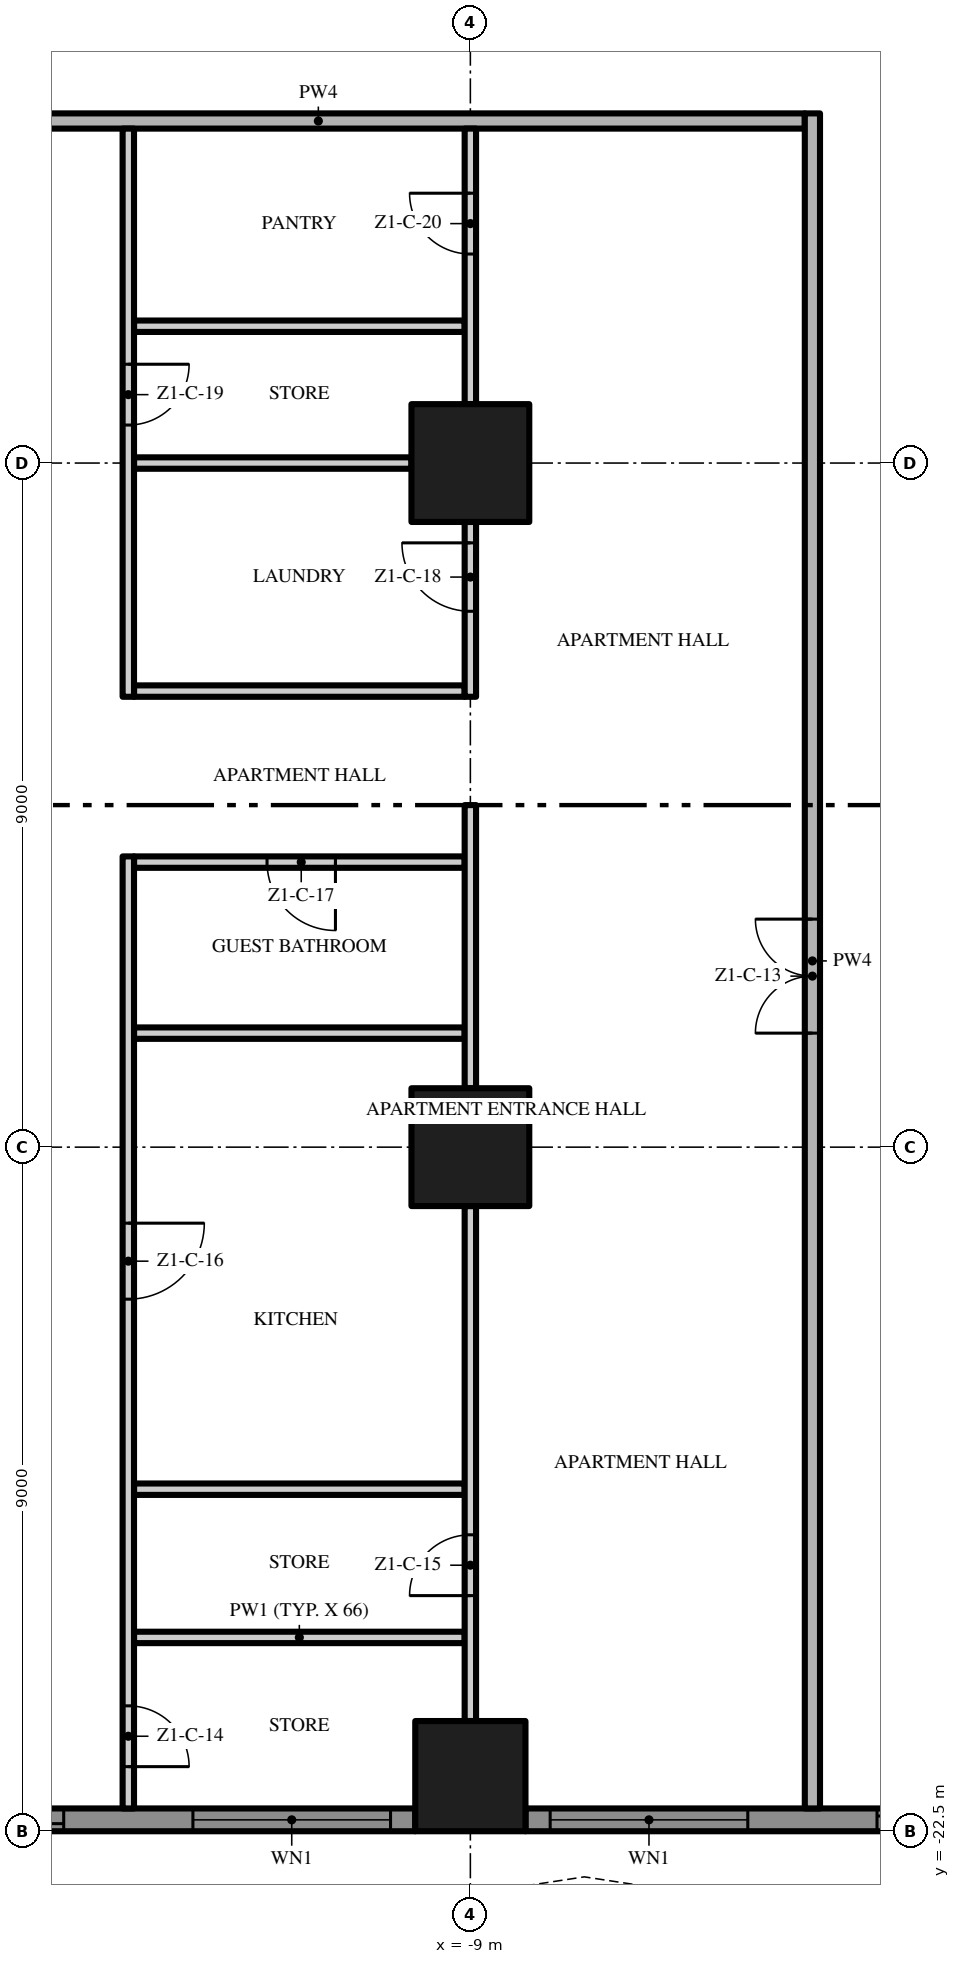
"""IFC4 building model, lengths in metres.
Left out: names, types, materials, properties, quantities, classifications, styles, units other than length and angle.
Written with IfcOpenShell. Run it as: python <this file> out.ifc"""

import sys

from ifc_helpers import new_model, si_unit, direction, frame, frame_2d, origin, origin_2d, place, context, subcontext, project, spatial, polyline, rectangle, outline, extrude, element, fill, save


model = new_model("IFC4")
c1 = context("Model", 3, precision=1e-05, world=origin(), true_north=direction((0.0, 1.0)))
c2 = subcontext(c1, "Body", "Model", "MODEL_VIEW")
j1 = project(units=[si_unit("LENGTHUNIT", "METRE"), si_unit("PLANEANGLEUNIT", "RADIAN")], contexts=[c1])
p1 = place(None, origin())
s1 = spatial("IfcSite", under=j1, at=p1, CompositionType="ELEMENT")
p2 = place(p1, origin())
s2 = spatial("IfcBuilding", under=s1, at=p2, CompositionType="ELEMENT")
p3 = place(p2, frame((0.0, 0.0, 37.8)))
s3 = spatial("IfcBuildingStorey", under=s2, at=p3, CompositionType="ELEMENT", Elevation=37.8)
p4 = place(p3, frame((-9.0, -13.5, 0.0), z_axis=(0.0, 0.0, 1.0), x_axis=(1.0, 0.0, 0.0)))
e1 = element("IfcColumn", 1, at=p4, inside=s3, PredefinedType="COLUMN", context=c2, shape_type="SweptSolid", body=[
    extrude(rectangle(XDim=1.55, YDim=1.55, at=origin_2d()), origin(), (0.0, 0.0, 1.0), 3.5),
])
p5 = place(p3, frame((-9.0, -21.775, 0.0), z_axis=(0.0, 0.0, 1.0), x_axis=(1.0, 0.0, 0.0)))
e2 = element("IfcColumn", 2, at=p5, inside=s3, PredefinedType="COLUMN", context=c2, shape_type="SweptSolid", body=[
    extrude(rectangle(XDim=1.45, YDim=1.45, at=origin_2d()), origin(), (0.0, 0.0, 1.0), 3.5),
])
p6 = place(p3, frame((-9.0, -4.5, 0.0), z_axis=(0.0, 0.0, 1.0), x_axis=(1.0, 0.0, 0.0)))
e3 = element("IfcColumn", 3, at=p6, inside=s3, PredefinedType="COLUMN", context=c2, shape_type="SweptSolid", body=[
    extrude(rectangle(XDim=1.55, YDim=1.55, at=origin_2d()), origin(), (0.0, 0.0, 1.0), 3.5),
])
p7 = place(p3, frame((-9.725, -22.35, 0.0), z_axis=(0.0, 0.0, 1.0), x_axis=(-1.0, 0.0, 0.0)))
e4 = element("IfcWall", 4, at=p7, inside=s3, PredefinedType="SOLIDWALL", context=c2, shape_type="SweptSolid", body=[
    extrude(rectangle(XDim=7.55, YDim=0.3, at=frame_2d((3.775, 0.0))), origin(), (0.0, 0.0, 1.0), 3.5),
])
p8 = place(p7, frame((4.625, 0.0, 0.0)))
e5 = element("IfcOpeningElement", 5, at=p8, cuts=e4, PredefinedType="OPENING", context=c2, shape_type="SweptSolid", body=[
    extrude(rectangle(XDim=2.6, YDim=2.4, at=frame_2d((1.3, 1.2))), frame((0.0, 0.16, 0.0), z_axis=(0.0, -1.0, 0.0), x_axis=(1.0, 0.0, 0.0)), (0.0, 0.0, 1.0), 0.32),
])
p9 = place(p7, frame((0.325, 0.0, 0.45)))
e6 = element("IfcOpeningElement", 6, at=p9, cuts=e4, PredefinedType="OPENING", context=c2, shape_type="SweptSolid", body=[
    extrude(rectangle(XDim=2.6, YDim=2.65, at=frame_2d((1.3, 1.325))), frame((0.0, 0.16, 0.0), z_axis=(0.0, -1.0, 0.0), x_axis=(1.0, 0.0, 0.0)), (0.0, 0.0, 1.0), 0.32),
])
p10 = place(p3, frame((-0.725, -22.35, 0.0), z_axis=(0.0, 0.0, 1.0), x_axis=(-1.0, 0.0, 0.0)))
e7 = element("IfcWall", 7, at=p10, inside=s3, PredefinedType="SOLIDWALL", context=c2, shape_type="SweptSolid", body=[
    extrude(rectangle(XDim=7.55, YDim=0.3, at=frame_2d((3.775, 0.0))), origin(), (0.0, 0.0, 1.0), 3.5),
])
p11 = place(p10, frame((4.625, 0.0, 0.45)))
e8 = element("IfcOpeningElement", 8, at=p11, cuts=e7, PredefinedType="OPENING", context=c2, shape_type="SweptSolid", body=[
    extrude(rectangle(XDim=2.6, YDim=2.65, at=frame_2d((1.3, 1.325))), frame((0.0, 0.16, 0.0), z_axis=(0.0, -1.0, 0.0), x_axis=(1.0, 0.0, 0.0)), (0.0, 0.0, 1.0), 0.32),
])
p12 = place(p10, frame((0.325, 0.0, 0.0)))
e9 = element("IfcOpeningElement", 9, at=p12, cuts=e7, PredefinedType="OPENING", context=c2, shape_type="SweptSolid", body=[
    extrude(rectangle(XDim=2.6, YDim=2.4, at=frame_2d((1.3, 1.2))), frame((0.0, 0.16, 0.0), z_axis=(0.0, -1.0, 0.0), x_axis=(1.0, 0.0, 0.0)), (0.0, 0.0, 1.0), 0.32),
])
p13 = place(p3, origin())
e10 = element("IfcWall", 10, at=p13, inside=s3, PredefinedType="USERDEFINED", context=c2, shape_type="SweptSolid", body=[
    extrude(outline(polyline([(-22.5, -23.1), (-21.0, -23.329), (-19.5, -23.929), (-18.0, -24.671), (-16.5, -25.271), (-15.0, -25.5), (-13.5, -25.271), (-12.0, -24.671), (-10.5, -23.929), (-9.0, -23.329), (-7.5, -23.1), (-6.0, -23.329), (-4.5, -23.929), (-3.0, -24.671), (-1.5, -25.271), (0.0, -25.5), (1.5, -25.271), (3.0, -24.671), (4.5, -23.929), (6.0, -23.329), (7.5, -23.1), (9.0, -23.329), (10.5, -23.929), (12.0, -24.671), (13.5, -25.271), (15.0, -25.5), (16.5, -25.271), (18.0, -24.671), (19.5, -23.929), (21.0, -23.329), (22.5, -23.1), (22.462, -22.853), (20.934, -23.086), (19.398, -23.701), (17.898, -24.442), (16.434, -25.028), (15.0, -25.247), (13.566, -25.028), (12.102, -24.442), (10.602, -23.701), (9.066, -23.086), (7.5, -22.847), (5.934, -23.086), (4.398, -23.701), (2.898, -24.442), (1.434, -25.028), (0.0, -25.247), (-1.434, -25.028), (-2.898, -24.442), (-4.398, -23.701), (-5.934, -23.086), (-7.5, -22.847), (-9.066, -23.086), (-10.602, -23.701), (-12.102, -24.442), (-13.566, -25.028), (-15.0, -25.247), (-16.434, -25.028), (-17.898, -24.442), (-19.398, -23.701), (-20.934, -23.086), (-22.462, -22.853), (-22.5, -23.1)])), origin(), (0.0, 0.0, 1.0), 0.9),
])
for number, where, z_axis, x_axis in (
    (11, (-13.425, -19.95, 0.0), (0.0, 0.0, 1.0), (1.0, 0.0, 0.0)),
    (12, (-13.425, -18.0, 0.0), (0.0, 0.0, 1.0), (1.0, 0.0, 0.0)),
    (13, (-13.425, -12.0, 0.0), (0.0, 0.0, 1.0), (1.0, 0.0, 0.0)),
):
    element("IfcWall", number, at=place(p3, frame(where, z_axis=z_axis, x_axis=x_axis)), inside=s3, PredefinedType="PARTITIONING", context=c2, shape_type="SweptSolid", body=[
        extrude(rectangle(XDim=4.35, YDim=0.15, at=frame_2d((2.175, 0.0))), origin(), (0.0, 0.0, 1.0), 3.5),
    ])
p14 = place(p3, frame((-9.075, -9.75, 0.0), z_axis=(0.0, 0.0, 1.0), x_axis=(-1.0, 0.0, 0.0)))
e14 = element("IfcWall", 14, at=p14, inside=s3, PredefinedType="PARTITIONING", context=c2, shape_type="SweptSolid", body=[
    extrude(rectangle(XDim=4.35, YDim=0.15, at=frame_2d((2.175, 0.0))), origin(), (0.0, 0.0, 1.0), 3.5),
])
p15 = place(p14, frame((1.7, 0.0, 0.0)))
e15 = element("IfcOpeningElement", 15, at=p15, cuts=e14, PredefinedType="OPENING", context=c2, shape_type="SweptSolid", body=[
    extrude(rectangle(XDim=0.9, YDim=2.1, at=frame_2d((0.45, 1.05))), frame((0.0, 0.085, 0.0), z_axis=(0.0, -1.0, 0.0), x_axis=(1.0, 0.0, 0.0)), (0.0, 0.0, 1.0), 0.17),
])
p16 = place(p3, frame((-13.425, -7.5, 0.0), z_axis=(0.0, 0.0, 1.0), x_axis=(1.0, 0.0, 0.0)))
e16 = element("IfcWall", 16, at=p16, inside=s3, PredefinedType="PARTITIONING", context=c2, shape_type="SweptSolid", body=[
    extrude(rectangle(XDim=4.35, YDim=0.15, at=frame_2d((2.175, 0.0))), origin(), (0.0, 0.0, 1.0), 3.5),
])
p17 = place(p3, frame((-13.425, -4.5, 0.0), z_axis=(0.0, 0.0, 1.0), x_axis=(1.0, 0.0, 0.0)))
e17 = element("IfcWall", 17, at=p17, inside=s3, PredefinedType="PARTITIONING", context=c2, shape_type="SweptSolid", body=[
    extrude(rectangle(XDim=3.65, YDim=0.15, at=frame_2d((1.825, 0.0))), origin(), (0.0, 0.0, 1.0), 3.5),
])
p18 = place(p3, frame((-13.425, -2.7, 0.0), z_axis=(0.0, 0.0, 1.0), x_axis=(1.0, 0.0, 0.0)))
e18 = element("IfcWall", 18, at=p18, inside=s3, PredefinedType="PARTITIONING", context=c2, shape_type="SweptSolid", body=[
    extrude(rectangle(XDim=4.35, YDim=0.15, at=frame_2d((2.175, 0.0))), origin(), (0.0, 0.0, 1.0), 3.5),
])
p19 = place(p3, frame((-17.4, 0.0, 0.0), z_axis=(0.0, 0.0, 1.0), x_axis=(1.0, 0.0, 0.0)))
e19 = element("IfcWall", 19, at=p19, inside=s3, PredefinedType="PARTITIONING", context=c2, shape_type="SweptSolid", body=[
    extrude(rectangle(XDim=12.8, YDim=0.2, at=frame_2d((6.4, 0.0))), origin(), (0.0, 0.0, 1.0), 3.5),
])
p20 = place(p3, frame((-13.5, -9.675, 0.0), z_axis=(0.0, 0.0, 1.0), x_axis=(0.0, -1.0, 0.0)))
e20 = element("IfcWall", 20, at=p20, inside=s3, PredefinedType="PARTITIONING", context=c2, shape_type="SweptSolid", body=[
    extrude(rectangle(XDim=12.525, YDim=0.15, at=frame_2d((6.263, 0.0))), origin(), (0.0, 0.0, 1.0), 3.5),
])
p21 = place(p20, frame((11.175, 0.0, 0.0)))
e21 = element("IfcOpeningElement", 21, at=p21, cuts=e20, PredefinedType="OPENING", context=c2, shape_type="SweptSolid", body=[
    extrude(rectangle(XDim=0.8, YDim=2.0, at=frame_2d((0.4, 1.0))), frame((0.0, 0.085, 0.0), z_axis=(0.0, -1.0, 0.0), x_axis=(1.0, 0.0, 0.0)), (0.0, 0.0, 1.0), 0.17),
])
p22 = place(p20, frame((4.825, 0.0, 0.0)))
e22 = element("IfcOpeningElement", 22, at=p22, cuts=e20, PredefinedType="OPENING", context=c2, shape_type="SweptSolid", body=[
    extrude(rectangle(XDim=1.0, YDim=2.4, at=frame_2d((0.5, 1.2))), frame((0.0, 0.085, 0.0), z_axis=(0.0, -1.0, 0.0), x_axis=(1.0, 0.0, 0.0)), (0.0, 0.0, 1.0), 0.17),
])
p23 = place(p3, frame((-13.5, -0.1, 0.0), z_axis=(0.0, 0.0, 1.0), x_axis=(0.0, -1.0, 0.0)))
e23 = element("IfcWall", 23, at=p23, inside=s3, PredefinedType="PARTITIONING", context=c2, shape_type="SweptSolid", body=[
    extrude(rectangle(XDim=7.475, YDim=0.15, at=frame_2d((3.737, 0.0))), origin(), (0.0, 0.0, 1.0), 3.5),
])
p24 = place(p23, frame((3.1, 0.0, 0.0)))
e24 = element("IfcOpeningElement", 24, at=p24, cuts=e23, PredefinedType="OPENING", context=c2, shape_type="SweptSolid", body=[
    extrude(rectangle(XDim=0.8, YDim=2.0, at=frame_2d((0.4, 1.0))), frame((0.0, 0.085, 0.0), z_axis=(0.0, -1.0, 0.0), x_axis=(1.0, 0.0, 0.0)), (0.0, 0.0, 1.0), 0.17),
])
p25 = place(p3, frame((-9.0, -21.05, 0.0), z_axis=(0.0, 0.0, 1.0), x_axis=(0.0, 1.0, 0.0)))
e25 = element("IfcWall", 25, at=p25, inside=s3, PredefinedType="PARTITIONING", context=c2, shape_type="SweptSolid", body=[
    extrude(rectangle(XDim=6.775, YDim=0.15, at=frame_2d((3.388, 0.0))), origin(), (0.0, 0.0, 1.0), 3.5),
])
p26 = place(p25, frame((1.65, 0.0, 0.0)))
e26 = element("IfcOpeningElement", 26, at=p26, cuts=e25, PredefinedType="OPENING", context=c2, shape_type="SweptSolid", body=[
    extrude(rectangle(XDim=0.8, YDim=2.0, at=frame_2d((0.4, 1.0))), frame((0.0, 0.085, 0.0), z_axis=(0.0, -1.0, 0.0), x_axis=(1.0, 0.0, 0.0)), (0.0, 0.0, 1.0), 0.17),
])
p27 = place(p3, frame((-9.0, -12.725, 0.0), z_axis=(0.0, 0.0, 1.0), x_axis=(0.0, 1.0, 0.0)))
e27 = element("IfcWall", 27, at=p27, inside=s3, PredefinedType="PARTITIONING", context=c2, shape_type="SweptSolid", body=[
    extrude(rectangle(XDim=3.725, YDim=0.15, at=frame_2d((1.863, 0.0))), origin(), (0.0, 0.0, 1.0), 3.5),
])
p28 = place(p3, frame((-9.0, -7.575, 0.0), z_axis=(0.0, 0.0, 1.0), x_axis=(0.0, 1.0, 0.0)))
e28 = element("IfcWall", 28, at=p28, inside=s3, PredefinedType="PARTITIONING", context=c2, shape_type="SweptSolid", body=[
    extrude(rectangle(XDim=2.3, YDim=0.15, at=frame_2d((1.15, 0.0))), origin(), (0.0, 0.0, 1.0), 3.5),
])
p29 = place(p28, frame((1.125, 0.0, 0.0)))
e29 = element("IfcOpeningElement", 29, at=p29, cuts=e28, PredefinedType="OPENING", context=c2, shape_type="SweptSolid", body=[
    extrude(rectangle(XDim=0.9, YDim=2.1, at=frame_2d((0.45, 1.05))), frame((0.0, 0.085, 0.0), z_axis=(0.0, -1.0, 0.0), x_axis=(1.0, 0.0, 0.0)), (0.0, 0.0, 1.0), 0.17),
])
p30 = place(p3, frame((-9.0, -3.725, 0.0), z_axis=(0.0, 0.0, 1.0), x_axis=(0.0, 1.0, 0.0)))
e30 = element("IfcWall", 30, at=p30, inside=s3, PredefinedType="PARTITIONING", context=c2, shape_type="SweptSolid", body=[
    extrude(rectangle(XDim=3.625, YDim=0.15, at=frame_2d((1.812, 0.0))), origin(), (0.0, 0.0, 1.0), 3.5),
])
p31 = place(p30, frame((1.975, 0.0, 0.0)))
e31 = element("IfcOpeningElement", 31, at=p31, cuts=e30, PredefinedType="OPENING", context=c2, shape_type="SweptSolid", body=[
    extrude(rectangle(XDim=0.8, YDim=2.0, at=frame_2d((0.4, 1.0))), frame((0.0, 0.085, 0.0), z_axis=(0.0, -1.0, 0.0), x_axis=(1.0, 0.0, 0.0)), (0.0, 0.0, 1.0), 0.17),
])
p32 = place(p3, frame((-4.5, -22.2, 0.0), z_axis=(0.0, 0.0, 1.0), x_axis=(0.0, 1.0, 0.0)))
e32 = element("IfcWall", 32, at=p32, inside=s3, PredefinedType="PARTITIONING", context=c2, shape_type="SweptSolid", body=[
    extrude(rectangle(XDim=22.3, YDim=0.2, at=frame_2d((11.15, 0.0))), origin(), (0.0, 0.0, 1.0), 3.5),
])
p33 = place(p32, frame((10.2, 0.0, 0.0)))
e33 = element("IfcOpeningElement", 33, at=p33, cuts=e32, PredefinedType="OPENING", context=c2, shape_type="SweptSolid", body=[
    extrude(rectangle(XDim=1.5, YDim=2.4, at=frame_2d((0.75, 1.2))), frame((0.0, 0.11, 0.0), z_axis=(0.0, -1.0, 0.0), x_axis=(1.0, 0.0, 0.0)), (0.0, 0.0, 1.0), 0.22),
])
p34 = place(p8, origin())
e34 = element("IfcDoor", 34, at=p34, inside=s3, OperationType="SINGLE_SWING_LEFT", PredefinedType="DOOR", context=c2, shape_type="SweptSolid", body=[
    extrude(rectangle(XDim=2.6, YDim=2.4, at=frame_2d((1.3, 1.2))), frame((0.0, 0.025, 0.0), z_axis=(0.0, -1.0, 0.0), x_axis=(1.0, 0.0, 0.0)), (0.0, 0.0, 1.0), 0.05),
])
fill(e5, e34)
p35 = place(p9, origin())
e35 = element("IfcWindow", 35, at=p35, inside=s3, PartitioningType="SINGLE_PANEL", PredefinedType="WINDOW", context=c2, shape_type="SweptSolid", body=[
    extrude(rectangle(XDim=2.6, YDim=2.65, at=frame_2d((1.3, 1.325))), frame((0.0, 0.03, 0.0), z_axis=(0.0, -1.0, 0.0), x_axis=(1.0, 0.0, 0.0)), (0.0, 0.0, 1.0), 0.06),
])
fill(e6, e35)
p36 = place(p11, origin())
e36 = element("IfcWindow", 36, at=p36, inside=s3, PartitioningType="SINGLE_PANEL", PredefinedType="WINDOW", context=c2, shape_type="SweptSolid", body=[
    extrude(rectangle(XDim=2.6, YDim=2.65, at=frame_2d((1.3, 1.325))), frame((0.0, 0.03, 0.0), z_axis=(0.0, -1.0, 0.0), x_axis=(1.0, 0.0, 0.0)), (0.0, 0.0, 1.0), 0.06),
])
fill(e8, e36)
p37 = place(p12, origin())
e37 = element("IfcDoor", 37, at=p37, inside=s3, OperationType="SINGLE_SWING_LEFT", PredefinedType="DOOR", context=c2, shape_type="SweptSolid", body=[
    extrude(rectangle(XDim=2.6, YDim=2.4, at=frame_2d((1.3, 1.2))), frame((0.0, 0.025, 0.0), z_axis=(0.0, -1.0, 0.0), x_axis=(1.0, 0.0, 0.0)), (0.0, 0.0, 1.0), 0.05),
])
fill(e9, e37)
p38 = place(p33, origin())
e38 = element("IfcDoor", 38, at=p38, inside=s3, OperationType="DOUBLE_DOOR_SINGLE_SWING", PredefinedType="DOOR", context=c2, shape_type="SweptSolid", body=[
    extrude(rectangle(XDim=1.5, YDim=2.4, at=frame_2d((0.75, 1.2))), frame((0.0, 0.025, 0.0), z_axis=(0.0, -1.0, 0.0), x_axis=(1.0, 0.0, 0.0)), (0.0, 0.0, 1.0), 0.05),
])
fill(e33, e38)
p39 = place(p21, origin())
e39 = element("IfcDoor", 39, at=p39, inside=s3, OperationType="SINGLE_SWING_RIGHT", PredefinedType="DOOR", context=c2, shape_type="SweptSolid", body=[
    extrude(rectangle(XDim=0.8, YDim=2.0, at=frame_2d((0.4, 1.0))), frame((0.0, 0.025, 0.0), z_axis=(0.0, -1.0, 0.0), x_axis=(1.0, 0.0, 0.0)), (0.0, 0.0, 1.0), 0.05),
])
fill(e21, e39)
p40 = place(p26, origin())
e40 = element("IfcDoor", 40, at=p40, inside=s3, OperationType="SINGLE_SWING_LEFT", PredefinedType="DOOR", context=c2, shape_type="SweptSolid", body=[
    extrude(rectangle(XDim=0.8, YDim=2.0, at=frame_2d((0.4, 1.0))), frame((0.0, 0.025, 0.0), z_axis=(0.0, -1.0, 0.0), x_axis=(1.0, 0.0, 0.0)), (0.0, 0.0, 1.0), 0.05),
])
fill(e26, e40)
p41 = place(p22, origin())
e41 = element("IfcDoor", 41, at=p41, inside=s3, OperationType="SINGLE_SWING_LEFT", PredefinedType="DOOR", context=c2, shape_type="SweptSolid", body=[
    extrude(rectangle(XDim=1.0, YDim=2.4, at=frame_2d((0.5, 1.2))), frame((0.0, 0.025, 0.0), z_axis=(0.0, -1.0, 0.0), x_axis=(1.0, 0.0, 0.0)), (0.0, 0.0, 1.0), 0.05),
])
fill(e22, e41)
p42 = place(p15, origin())
e42 = element("IfcDoor", 42, at=p42, inside=s3, OperationType="SINGLE_SWING_LEFT", PredefinedType="DOOR", context=c2, shape_type="SweptSolid", body=[
    extrude(rectangle(XDim=0.9, YDim=2.1, at=frame_2d((0.45, 1.05))), frame((0.0, 0.025, 0.0), z_axis=(0.0, -1.0, 0.0), x_axis=(1.0, 0.0, 0.0)), (0.0, 0.0, 1.0), 0.05),
])
fill(e15, e42)
p43 = place(p29, origin())
e43 = element("IfcDoor", 43, at=p43, inside=s3, OperationType="SINGLE_SWING_RIGHT", PredefinedType="DOOR", context=c2, shape_type="SweptSolid", body=[
    extrude(rectangle(XDim=0.9, YDim=2.1, at=frame_2d((0.45, 1.05))), frame((0.0, 0.025, 0.0), z_axis=(0.0, -1.0, 0.0), x_axis=(1.0, 0.0, 0.0)), (0.0, 0.0, 1.0), 0.05),
])
fill(e29, e43)
p44 = place(p24, origin())
e44 = element("IfcDoor", 44, at=p44, inside=s3, OperationType="SINGLE_SWING_LEFT", PredefinedType="DOOR", context=c2, shape_type="SweptSolid", body=[
    extrude(rectangle(XDim=0.8, YDim=2.0, at=frame_2d((0.4, 1.0))), frame((0.0, 0.025, 0.0), z_axis=(0.0, -1.0, 0.0), x_axis=(1.0, 0.0, 0.0)), (0.0, 0.0, 1.0), 0.05),
])
fill(e24, e44)
p45 = place(p31, origin())
e45 = element("IfcDoor", 45, at=p45, inside=s3, OperationType="SINGLE_SWING_RIGHT", PredefinedType="DOOR", context=c2, shape_type="SweptSolid", body=[
    extrude(rectangle(XDim=0.8, YDim=2.0, at=frame_2d((0.4, 1.0))), frame((0.0, 0.025, 0.0), z_axis=(0.0, -1.0, 0.0), x_axis=(1.0, 0.0, 0.0)), (0.0, 0.0, 1.0), 0.05),
])
fill(e31, e45)
save(model, sys.argv[1])
